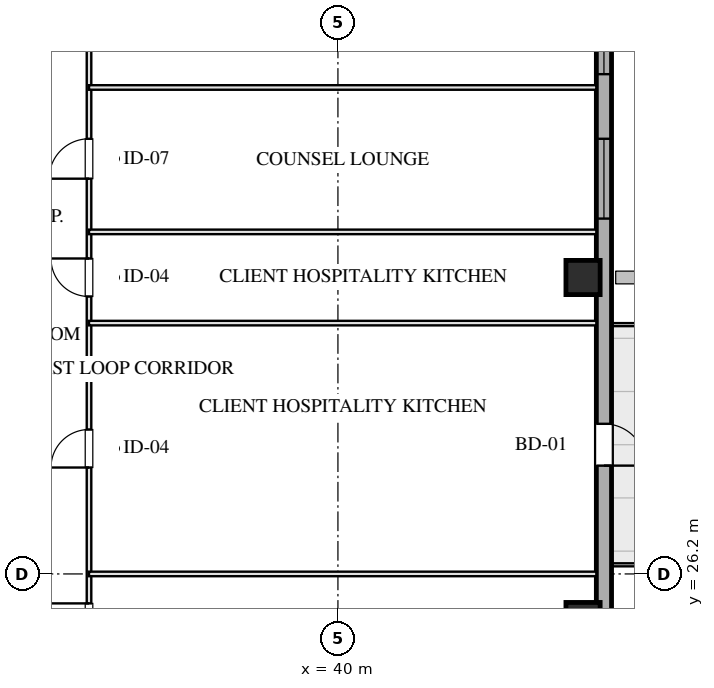
"""IFC4 building model, lengths in metres.
Left out: names, types, materials, properties, quantities, classifications, styles, units other than length and angle.
Written with IfcOpenShell. Run it as: python <this file> out.ifc"""

import sys

from ifc_helpers import new_model, si_unit, direction, frame, frame_2d, origin, origin_2d, place, context, subcontext, project, spatial, rectangle, hollow_rectangle, extrude, element, fill, save


model = new_model("IFC4")
c1 = context("Model", 3, precision=1e-05, world=origin(), true_north=direction((0.0, 1.0)))
c2 = subcontext(c1, "Body", "Model", "MODEL_VIEW")
j1 = project(units=[si_unit("LENGTHUNIT", "METRE"), si_unit("PLANEANGLEUNIT", "RADIAN")], contexts=[c1])
p1 = place(None, origin())
s1 = spatial("IfcSite", under=j1, at=p1, CompositionType="ELEMENT")
p2 = place(p1, origin())
s2 = spatial("IfcBuilding", under=s1, at=p2, CompositionType="ELEMENT")
p3 = place(p2, frame((0.0, 0.0, 195.5)))
s3 = spatial("IfcBuildingStorey", under=s2, at=p3, CompositionType="ELEMENT", Elevation=195.5)
for number, where, z_axis, x_axis in (
    (1, (46.45, 25.0, 0.0), (0.0, 0.0, 1.0), (1.0, 0.0, 0.0)),
    (2, (46.45, 34.0, 0.0), (0.0, 0.0, 1.0), (1.0, 0.0, 0.0)),
):
    element("IfcColumn", number, at=place(p3, frame(where, z_axis=z_axis, x_axis=x_axis)), inside=s3, PredefinedType="COLUMN", context=c2, shape_type="SweptSolid", body=[
        extrude(hollow_rectangle(XDim=0.9, YDim=0.9, WallThickness=0.032, at=origin_2d()), origin(), (0.0, 0.0, 1.0), 3.451),
    ])
p4 = place(p3, frame((47.0, 57.2, 0.0), z_axis=(0.0, 0.0, 1.0), x_axis=(0.0, -1.0, 0.0)))
e3 = element("IfcWall", 3, at=p4, inside=s3, PredefinedType="SOLIDWALL", context=c2, shape_type="SweptSolid", body=[
    extrude(rectangle(XDim=46.4, YDim=0.4, at=frame_2d((23.2, 0.0))), origin(), (0.0, 0.0, 1.0), 2.61),
])
p5 = place(p4, frame((19.55, 0.0, 0.75)))
e4 = element("IfcOpeningElement", 4, at=p5, cuts=e3, PredefinedType="OPENING", context=c2, shape_type="SweptSolid", body=[
    extrude(rectangle(XDim=2.1, YDim=1.46, at=frame_2d((1.05, 0.73))), frame((0.0, 0.21, 0.0), z_axis=(0.0, -1.0, 0.0), x_axis=(1.0, 0.0, 0.0)), (0.0, 0.0, 1.0), 0.42),
])
p6 = place(p4, frame((15.75, 0.0, 0.75)))
e5 = element("IfcOpeningElement", 5, at=p6, cuts=e3, PredefinedType="OPENING", context=c2, shape_type="SweptSolid", body=[
    extrude(rectangle(XDim=2.1, YDim=1.46, at=frame_2d((1.05, 0.73))), frame((0.0, 0.21, 0.0), z_axis=(0.0, -1.0, 0.0), x_axis=(1.0, 0.0, 0.0)), (0.0, 0.0, 1.0), 0.42),
])
p7 = place(p4, frame((27.05, 0.0, 0.0)))
e6 = element("IfcOpeningElement", 6, at=p7, cuts=e3, PredefinedType="OPENING", context=c2, shape_type="SweptSolid", body=[
    extrude(rectangle(XDim=1.1, YDim=2.15, at=frame_2d((0.55, 1.075))), frame((0.0, 0.21, 0.0), z_axis=(0.0, -1.0, 0.0), x_axis=(1.0, 0.0, 0.0)), (0.0, 0.0, 1.0), 0.42),
])
p8 = place(p3, frame((33.45, 23.65, 0.0), z_axis=(0.0, 0.0, 1.0), x_axis=(0.0, 1.0, 0.0)))
e7 = element("IfcWall", 7, at=p8, inside=s3, PredefinedType="PARTITIONING", context=c2, shape_type="SweptSolid", body=[
    extrude(rectangle(XDim=20.7, YDim=0.12, at=frame_2d((10.35, 0.0))), origin(), (0.0, 0.0, 1.0), 3.175),
])
p9 = place(p8, frame((0.775, 0.0, 0.0)))
e8 = element("IfcOpeningElement", 8, at=p9, cuts=e7, PredefinedType="OPENING", context=c2, shape_type="SweptSolid", body=[
    extrude(rectangle(XDim=1.0, YDim=2.05, at=frame_2d((0.5, 1.025))), frame((0.0, 0.07, 0.0), z_axis=(0.0, -1.0, 0.0), x_axis=(1.0, 0.0, 0.0)), (0.0, 0.0, 1.0), 0.14),
])
p10 = place(p8, frame((5.35, 0.0, 0.0)))
e9 = element("IfcOpeningElement", 9, at=p10, cuts=e7, PredefinedType="OPENING", context=c2, shape_type="SweptSolid", body=[
    extrude(rectangle(XDim=1.0, YDim=2.05, at=frame_2d((0.5, 1.025))), frame((0.0, 0.07, 0.0), z_axis=(0.0, -1.0, 0.0), x_axis=(1.0, 0.0, 0.0)), (0.0, 0.0, 1.0), 0.14),
])
p11 = place(p8, frame((9.85, 0.0, 0.0)))
e10 = element("IfcOpeningElement", 10, at=p11, cuts=e7, PredefinedType="OPENING", context=c2, shape_type="SweptSolid", body=[
    extrude(rectangle(XDim=1.0, YDim=2.05, at=frame_2d((0.5, 1.025))), frame((0.0, 0.07, 0.0), z_axis=(0.0, -1.0, 0.0), x_axis=(1.0, 0.0, 0.0)), (0.0, 0.0, 1.0), 0.14),
])
p12 = place(p8, frame((12.95, 0.0, 0.0)))
e11 = element("IfcOpeningElement", 11, at=p12, cuts=e7, PredefinedType="OPENING", context=c2, shape_type="SweptSolid", body=[
    extrude(rectangle(XDim=1.05, YDim=2.05, at=frame_2d((0.525, 1.025))), frame((0.0, 0.07, 0.0), z_axis=(0.0, -1.0, 0.0), x_axis=(1.0, 0.0, 0.0)), (0.0, 0.0, 1.0), 0.14),
])
p13 = place(p8, frame((17.525, 0.0, 0.0)))
e12 = element("IfcOpeningElement", 12, at=p13, cuts=e7, PredefinedType="OPENING", context=c2, shape_type="SweptSolid", body=[
    extrude(rectangle(XDim=1.0, YDim=2.05, at=frame_2d((0.5, 1.025))), frame((0.0, 0.07, 0.0), z_axis=(0.0, -1.0, 0.0), x_axis=(1.0, 0.0, 0.0)), (0.0, 0.0, 1.0), 0.14),
])
for number, where, z_axis, x_axis in (
    (13, (33.45, 26.2, 0.0), (0.0, 0.0, 1.0), (1.0, 0.0, 0.0)),
    (14, (33.45, 32.8, 0.0), (0.0, 0.0, 1.0), (1.0, 0.0, 0.0)),
    (15, (33.45, 35.2, 0.0), (0.0, 0.0, 1.0), (1.0, 0.0, 0.0)),
    (16, (33.45, 39.0, 0.0), (0.0, 0.0, 1.0), (1.0, 0.0, 0.0)),
):
    element("IfcWall", number, at=place(p3, frame(where, z_axis=z_axis, x_axis=x_axis)), inside=s3, PredefinedType="PARTITIONING", context=c2, shape_type="SweptSolid", body=[
        extrude(rectangle(XDim=13.35, YDim=0.12, at=frame_2d((6.675, 0.0))), origin(), (0.0, 0.0, 1.0), 3.175),
    ])
p14 = place(p5, origin())
e17 = element("IfcWindow", 17, at=p14, inside=s3, PartitioningType="TRIPLE_PANEL_VERTICAL", PredefinedType="WINDOW", context=c2, shape_type="SweptSolid", body=[
    extrude(rectangle(XDim=2.1, YDim=1.46, at=frame_2d((1.05, 0.73))), frame((0.0, 0.03, 0.0), z_axis=(0.0, -1.0, 0.0), x_axis=(1.0, 0.0, 0.0)), (0.0, 0.0, 1.0), 0.06),
])
fill(e4, e17)
p15 = place(p6, origin())
e18 = element("IfcWindow", 18, at=p15, inside=s3, PartitioningType="TRIPLE_PANEL_VERTICAL", PredefinedType="WINDOW", context=c2, shape_type="SweptSolid", body=[
    extrude(rectangle(XDim=2.1, YDim=1.46, at=frame_2d((1.05, 0.73))), frame((0.0, 0.03, 0.0), z_axis=(0.0, -1.0, 0.0), x_axis=(1.0, 0.0, 0.0)), (0.0, 0.0, 1.0), 0.06),
])
fill(e5, e18)
p16 = place(p7, origin())
e19 = element("IfcDoor", 19, at=p16, inside=s3, OperationType="SINGLE_SWING_RIGHT", PredefinedType="DOOR", context=c2, shape_type="SweptSolid", body=[
    extrude(rectangle(XDim=1.1, YDim=2.15, at=frame_2d((0.55, 1.075))), frame((0.0, 0.025, 0.0), z_axis=(0.0, -1.0, 0.0), x_axis=(1.0, 0.0, 0.0)), (0.0, 0.0, 1.0), 0.05),
])
fill(e6, e19)
p17 = place(p9, origin())
e20 = element("IfcDoor", 20, at=p17, inside=s3, OperationType="SINGLE_SWING_RIGHT", PredefinedType="DOOR", context=c2, shape_type="SweptSolid", body=[
    extrude(rectangle(XDim=1.0, YDim=2.05, at=frame_2d((0.5, 1.025))), frame((0.0, 0.025, 0.0), z_axis=(0.0, -1.0, 0.0), x_axis=(1.0, 0.0, 0.0)), (0.0, 0.0, 1.0), 0.05),
])
fill(e8, e20)
p18 = place(p10, origin())
e21 = element("IfcDoor", 21, at=p18, inside=s3, OperationType="SINGLE_SWING_LEFT", PredefinedType="DOOR", context=c2, shape_type="SweptSolid", body=[
    extrude(rectangle(XDim=1.0, YDim=2.05, at=frame_2d((0.5, 1.025))), frame((0.0, 0.025, 0.0), z_axis=(0.0, -1.0, 0.0), x_axis=(1.0, 0.0, 0.0)), (0.0, 0.0, 1.0), 0.05),
])
fill(e9, e21)
p19 = place(p11, origin())
e22 = element("IfcDoor", 22, at=p19, inside=s3, OperationType="SINGLE_SWING_RIGHT", PredefinedType="DOOR", context=c2, shape_type="SweptSolid", body=[
    extrude(rectangle(XDim=1.0, YDim=2.05, at=frame_2d((0.5, 1.025))), frame((0.0, 0.025, 0.0), z_axis=(0.0, -1.0, 0.0), x_axis=(1.0, 0.0, 0.0)), (0.0, 0.0, 1.0), 0.05),
])
fill(e10, e22)
p20 = place(p12, origin())
e23 = element("IfcDoor", 23, at=p20, inside=s3, OperationType="SINGLE_SWING_LEFT", PredefinedType="DOOR", context=c2, shape_type="SweptSolid", body=[
    extrude(rectangle(XDim=1.05, YDim=2.05, at=frame_2d((0.525, 1.025))), frame((0.0, 0.025, 0.0), z_axis=(0.0, -1.0, 0.0), x_axis=(1.0, 0.0, 0.0)), (0.0, 0.0, 1.0), 0.05),
])
fill(e11, e23)
save(model, sys.argv[1])
